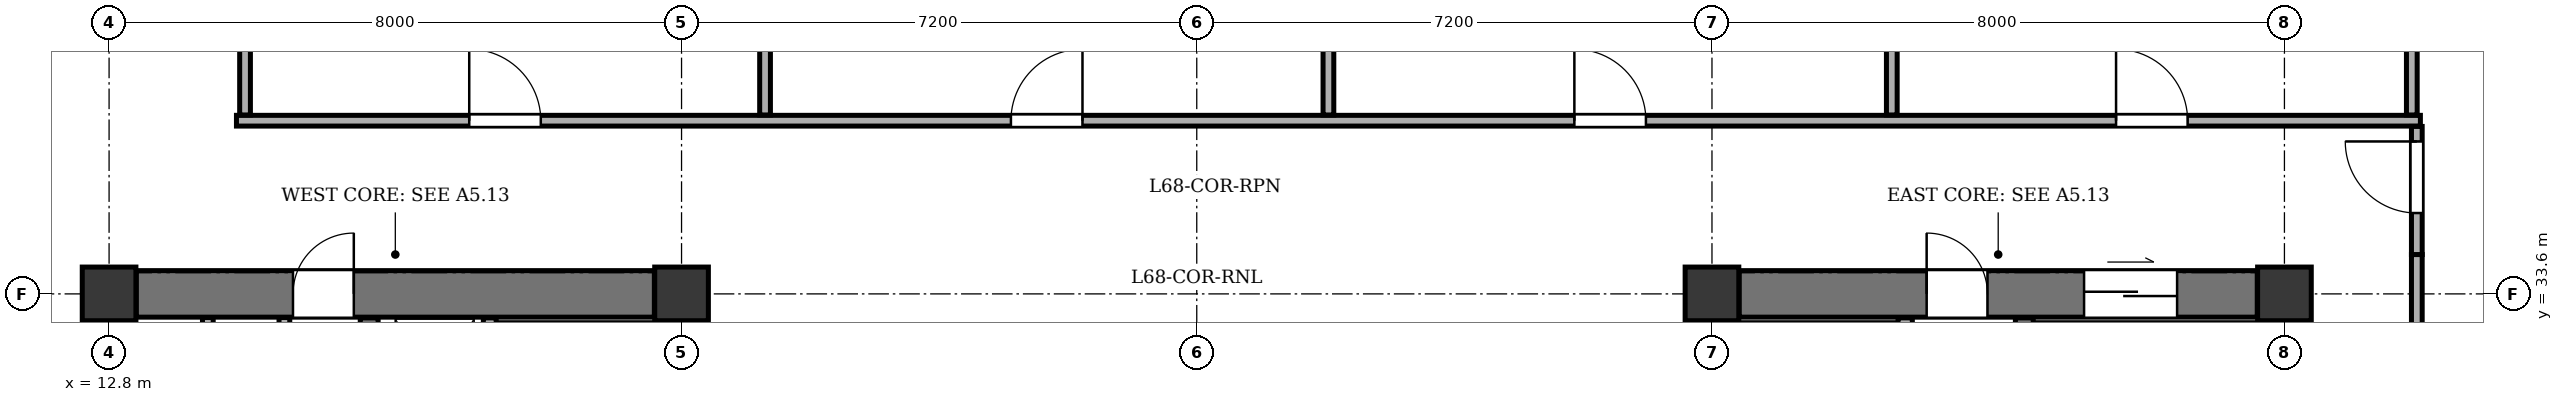
"""IFC4 building model, lengths in metres.
Left out: names, types, materials, properties, quantities, classifications, styles, units other than length and angle.
Written with IfcOpenShell. Run it as: python <this file> out.ifc"""

import sys

from ifc_helpers import new_model, si_unit, direction, frame, frame_2d, origin, origin_2d, place, context, subcontext, project, spatial, rectangle, extrude, element, fill, save


model = new_model("IFC4")
c1 = context("Model", 3, precision=1e-05, world=origin(), true_north=direction((0.0, 1.0)))
c2 = subcontext(c1, "Body", "Model", "MODEL_VIEW")
j1 = project(units=[si_unit("LENGTHUNIT", "METRE"), si_unit("PLANEANGLEUNIT", "RADIAN")], contexts=[c1])
p1 = place(None, origin())
s1 = spatial("IfcSite", under=j1, at=p1, CompositionType="ELEMENT")
p2 = place(p1, origin())
s2 = spatial("IfcBuilding", under=s1, at=p2, CompositionType="ELEMENT")
p3 = place(p2, frame((0.0, 0.0, 258.5)))
s3 = spatial("IfcBuildingStorey", under=s2, at=p3, CompositionType="ELEMENT", Elevation=258.5)
for number, where, z_axis, x_axis in (
    (1, (12.8, 33.6, 0.0), (0.0, 0.0, 1.0), (1.0, 0.0, 0.0)),
    (2, (20.8, 33.6, 0.0), (0.0, 0.0, 1.0), (1.0, 0.0, 0.0)),
    (3, (35.2, 33.6, 0.0), (0.0, 0.0, 1.0), (1.0, 0.0, 0.0)),
    (4, (43.2, 33.6, 0.0), (0.0, 0.0, 1.0), (1.0, 0.0, 0.0)),
):
    element("IfcColumn", number, at=place(p3, frame(where, z_axis=z_axis, x_axis=x_axis)), inside=s3, PredefinedType="COLUMN", context=c2, shape_type="SweptSolid", body=[
        extrude(rectangle(XDim=0.75, YDim=0.75, at=origin_2d()), origin(), (0.0, 0.0, 1.0), 3.4),
    ])
p4 = place(p3, frame((12.8, 21.18, 0.0), z_axis=(0.0, 0.0, 1.0), x_axis=(0.0, 1.0, 0.0)))
e5 = element("IfcWall", 5, at=p4, inside=s3, PredefinedType="SHEAR", context=c2, shape_type="SweptSolid", body=[
    extrude(rectangle(XDim=12.04, YDim=0.65, at=frame_2d((6.02, 0.0))), origin(), (0.0, 0.0, 1.0), 3.1),
])
p5 = place(p3, frame((13.18, 33.6, 0.0), z_axis=(0.0, 0.0, 1.0), x_axis=(1.0, 0.0, 0.0)))
e6 = element("IfcWall", 6, at=p5, inside=s3, PredefinedType="SHEAR", context=c2, shape_type="SweptSolid", body=[
    extrude(rectangle(XDim=7.24, YDim=0.65, at=frame_2d((3.62, 0.0))), origin(), (0.0, 0.0, 1.0), 3.1),
])
p6 = place(p5, frame((2.19, 0.0, 0.0)))
e7 = element("IfcOpeningElement", 7, at=p6, cuts=e6, PredefinedType="OPENING", context=c2, shape_type="SweptSolid", body=[
    extrude(rectangle(XDim=0.85, YDim=2.02, at=frame_2d((0.425, 1.01))), frame((0.0, 0.335, 0.0), z_axis=(0.0, -1.0, 0.0), x_axis=(1.0, 0.0, 0.0)), (0.0, 0.0, 1.0), 0.67),
])
p7 = place(p3, frame((20.8, 31.1, 0.0), z_axis=(0.0, 0.0, 1.0), x_axis=(0.0, 1.0, 0.0)))
e8 = element("IfcWall", 8, at=p7, inside=s3, PredefinedType="SHEAR", context=c2, shape_type="SweptSolid", body=[
    extrude(rectangle(XDim=2.12, YDim=0.65, at=frame_2d((1.06, 0.0))), origin(), (0.0, 0.0, 1.0), 3.1),
])
p8 = place(p7, frame((0.4, 0.0, 0.0)))
e9 = element("IfcOpeningElement", 9, at=p8, cuts=e8, PredefinedType="OPENING", context=c2, shape_type="SweptSolid", body=[
    extrude(rectangle(XDim=1.1, YDim=2.1, at=frame_2d((0.55, 1.05))), frame((0.0, 0.335, 0.0), z_axis=(0.0, -1.0, 0.0), x_axis=(1.0, 0.0, 0.0)), (0.0, 0.0, 1.0), 0.67),
])
p9 = place(p3, frame((16.435, 21.135, 0.0), z_axis=(0.0, 0.0, 1.0), x_axis=(0.0, 1.0, 0.0)))
e10 = element("IfcWall", 10, at=p9, inside=s3, PredefinedType="SHEAR", context=c2, shape_type="SweptSolid", body=[
    extrude(rectangle(XDim=12.13, YDim=0.25, at=frame_2d((6.065, 0.0))), origin(), (0.0, 0.0, 1.0), 3.1),
])
p10 = place(p9, frame((0.515, 0.0, 0.0)))
e11 = element("IfcOpeningElement", 11, at=p10, cuts=e10, PredefinedType="OPENING", context=c2, shape_type="SweptSolid", body=[
    extrude(rectangle(XDim=1.2, YDim=2.15, at=frame_2d((0.6, 1.075))), frame((0.0, 0.135, 0.0), z_axis=(0.0, -1.0, 0.0), x_axis=(1.0, 0.0, 0.0)), (0.0, 0.0, 1.0), 0.27),
])
p11 = place(p9, frame((2.665, 0.0, 0.0)))
e12 = element("IfcOpeningElement", 12, at=p11, cuts=e10, PredefinedType="OPENING", context=c2, shape_type="SweptSolid", body=[
    extrude(rectangle(XDim=1.15, YDim=2.15, at=frame_2d((0.575, 1.075))), frame((0.0, 0.135, 0.0), z_axis=(0.0, -1.0, 0.0), x_axis=(1.0, 0.0, 0.0)), (0.0, 0.0, 1.0), 0.27),
])
p12 = place(p3, frame((18.12, 31.17, 0.0), z_axis=(0.0, 0.0, 1.0), x_axis=(0.0, 1.0, 0.0)))
e13 = element("IfcWall", 13, at=p12, inside=s3, PredefinedType="PARTITIONING", context=c2, shape_type="SweptSolid", body=[
    extrude(rectangle(XDim=2.095, YDim=0.18, at=frame_2d((1.047, 0.0))), origin(), (0.0, 0.0, 1.0), 3.1),
])
p13 = place(p3, frame((43.2, 21.18, 0.0), z_axis=(0.0, 0.0, 1.0), x_axis=(0.0, 1.0, 0.0)))
e14 = element("IfcWall", 14, at=p13, inside=s3, PredefinedType="SHEAR", context=c2, shape_type="SweptSolid", body=[
    extrude(rectangle(XDim=12.04, YDim=0.65, at=frame_2d((6.02, 0.0))), origin(), (0.0, 0.0, 1.0), 3.1),
])
p14 = place(p3, frame((35.58, 33.6, 0.0), z_axis=(0.0, 0.0, 1.0), x_axis=(1.0, 0.0, 0.0)))
e15 = element("IfcWall", 15, at=p14, inside=s3, PredefinedType="SHEAR", context=c2, shape_type="SweptSolid", body=[
    extrude(rectangle(XDim=7.24, YDim=0.65, at=frame_2d((3.62, 0.0))), origin(), (0.0, 0.0, 1.0), 3.1),
])
p15 = place(p14, frame((4.82, 0.0, 0.0)))
e16 = element("IfcOpeningElement", 16, at=p15, cuts=e15, PredefinedType="OPENING", context=c2, shape_type="SweptSolid", body=[
    extrude(rectangle(XDim=1.3, YDim=2.15, at=frame_2d((0.65, 1.075))), frame((0.0, 0.335, 0.0), z_axis=(0.0, -1.0, 0.0), x_axis=(1.0, 0.0, 0.0)), (0.0, 0.0, 1.0), 0.67),
])
p16 = place(p14, frame((2.62, 0.0, 0.0)))
e17 = element("IfcOpeningElement", 17, at=p16, cuts=e15, PredefinedType="OPENING", context=c2, shape_type="SweptSolid", body=[
    extrude(rectangle(XDim=0.85, YDim=2.02, at=frame_2d((0.425, 1.01))), frame((0.0, 0.335, 0.0), z_axis=(0.0, -1.0, 0.0), x_axis=(1.0, 0.0, 0.0)), (0.0, 0.0, 1.0), 0.67),
])
p17 = place(p3, frame((35.2, 31.1, 0.0), z_axis=(0.0, 0.0, 1.0), x_axis=(0.0, 1.0, 0.0)))
e18 = element("IfcWall", 18, at=p17, inside=s3, PredefinedType="SHEAR", context=c2, shape_type="SweptSolid", body=[
    extrude(rectangle(XDim=2.12, YDim=0.65, at=frame_2d((1.06, 0.0))), origin(), (0.0, 0.0, 1.0), 3.1),
])
p18 = place(p17, frame((0.4, 0.0, 0.0)))
e19 = element("IfcOpeningElement", 19, at=p18, cuts=e18, PredefinedType="OPENING", context=c2, shape_type="SweptSolid", body=[
    extrude(rectangle(XDim=1.1, YDim=2.1, at=frame_2d((0.55, 1.05))), frame((0.0, 0.335, 0.0), z_axis=(0.0, -1.0, 0.0), x_axis=(1.0, 0.0, 0.0)), (0.0, 0.0, 1.0), 0.67),
])
p19 = place(p3, frame((39.565, 21.135, 0.0), z_axis=(0.0, 0.0, 1.0), x_axis=(0.0, 1.0, 0.0)))
e20 = element("IfcWall", 20, at=p19, inside=s3, PredefinedType="SHEAR", context=c2, shape_type="SweptSolid", body=[
    extrude(rectangle(XDim=12.13, YDim=0.25, at=frame_2d((6.065, 0.0))), origin(), (0.0, 0.0, 1.0), 3.1),
])
p20 = place(p19, frame((0.515, 0.0, 0.0)))
e21 = element("IfcOpeningElement", 21, at=p20, cuts=e20, PredefinedType="OPENING", context=c2, shape_type="SweptSolid", body=[
    extrude(rectangle(XDim=1.2, YDim=2.15, at=frame_2d((0.6, 1.075))), frame((0.0, 0.135, 0.0), z_axis=(0.0, -1.0, 0.0), x_axis=(1.0, 0.0, 0.0)), (0.0, 0.0, 1.0), 0.27),
])
p21 = place(p19, frame((2.665, 0.0, 0.0)))
e22 = element("IfcOpeningElement", 22, at=p21, cuts=e20, PredefinedType="OPENING", context=c2, shape_type="SweptSolid", body=[
    extrude(rectangle(XDim=1.15, YDim=2.15, at=frame_2d((0.575, 1.075))), frame((0.0, 0.135, 0.0), z_axis=(0.0, -1.0, 0.0), x_axis=(1.0, 0.0, 0.0)), (0.0, 0.0, 1.0), 0.27),
])
p22 = place(p3, frame((37.9, 25.27, 0.0), z_axis=(0.0, 0.0, 1.0), x_axis=(0.0, 1.0, 0.0)))
e23 = element("IfcWall", 23, at=p22, inside=s3, PredefinedType="SOLIDWALL", context=c2, shape_type="SweptSolid", body=[
    extrude(rectangle(XDim=7.995, YDim=0.2, at=frame_2d((3.998, 0.0))), origin(), (0.0, 0.0, 1.0), 3.1),
])
p23 = place(p3, frame((14.18, 30.96, 0.0), z_axis=(0.0, 0.0, 1.0), x_axis=(0.0, 1.0, 0.0)))
e24 = element("IfcWall", 24, at=p23, inside=s3, PredefinedType="PARTITIONING", context=c2, shape_type="SweptSolid", body=[
    extrude(rectangle(XDim=2.31, YDim=0.15, at=frame_2d((1.155, 0.0))), origin(), (0.0, 0.0, 1.0), 3.1),
])
p24 = place(p23, frame((0.47, 0.0, 0.0)))
e25 = element("IfcOpeningElement", 25, at=p24, cuts=e24, PredefinedType="OPENING", context=c2, shape_type="SweptSolid", body=[
    extrude(rectangle(XDim=0.85, YDim=2.02, at=frame_2d((0.425, 1.01))), frame((0.0, 0.085, 0.0), z_axis=(0.0, -1.0, 0.0), x_axis=(1.0, 0.0, 0.0)), (0.0, 0.0, 1.0), 0.17),
])
p25 = place(p3, frame((15.25, 30.96, 0.0), z_axis=(0.0, 0.0, 1.0), x_axis=(0.0, 1.0, 0.0)))
e26 = element("IfcWall", 26, at=p25, inside=s3, PredefinedType="PARTITIONING", context=c2, shape_type="SweptSolid", body=[
    extrude(rectangle(XDim=2.31, YDim=0.15, at=frame_2d((1.155, 0.0))), origin(), (0.0, 0.0, 1.0), 3.1),
])
p26 = place(p25, frame((0.47, 0.0, 0.0)))
e27 = element("IfcOpeningElement", 27, at=p26, cuts=e26, PredefinedType="OPENING", context=c2, shape_type="SweptSolid", body=[
    extrude(rectangle(XDim=0.85, YDim=2.02, at=frame_2d((0.425, 1.01))), frame((0.0, 0.085, 0.0), z_axis=(0.0, -1.0, 0.0), x_axis=(1.0, 0.0, 0.0)), (0.0, 0.0, 1.0), 0.17),
])
p27 = place(p3, frame((14.58, 36.02, 0.0), z_axis=(0.0, 0.0, 1.0), x_axis=(1.0, 0.0, 0.0)))
e28 = element("IfcWall", 28, at=p27, inside=s3, PredefinedType="PARTITIONING", context=c2, shape_type="SweptSolid", body=[
    extrude(rectangle(XDim=30.52, YDim=0.15, at=frame_2d((15.26, 0.0))), origin(), (0.0, 0.0, 1.0), 3.1),
])
p28 = place(p27, frame((3.253, 0.0, 0.0)))
e29 = element("IfcOpeningElement", 29, at=p28, cuts=e28, PredefinedType="OPENING", context=c2, shape_type="SweptSolid", body=[
    extrude(rectangle(XDim=1.0, YDim=2.1, at=frame_2d((0.5, 1.05))), frame((0.0, 0.085, 0.0), z_axis=(0.0, -1.0, 0.0), x_axis=(1.0, 0.0, 0.0)), (0.0, 0.0, 1.0), 0.17),
])
p29 = place(p27, frame((10.823, 0.0, 0.0)))
e30 = element("IfcOpeningElement", 30, at=p29, cuts=e28, PredefinedType="OPENING", context=c2, shape_type="SweptSolid", body=[
    extrude(rectangle(XDim=1.0, YDim=2.1, at=frame_2d((0.5, 1.05))), frame((0.0, 0.085, 0.0), z_axis=(0.0, -1.0, 0.0), x_axis=(1.0, 0.0, 0.0)), (0.0, 0.0, 1.0), 0.17),
])
p30 = place(p27, frame((18.697, 0.0, 0.0)))
e31 = element("IfcOpeningElement", 31, at=p30, cuts=e28, PredefinedType="OPENING", context=c2, shape_type="SweptSolid", body=[
    extrude(rectangle(XDim=1.0, YDim=2.1, at=frame_2d((0.5, 1.05))), frame((0.0, 0.085, 0.0), z_axis=(0.0, -1.0, 0.0), x_axis=(1.0, 0.0, 0.0)), (0.0, 0.0, 1.0), 0.17),
])
p31 = place(p27, frame((26.267, 0.0, 0.0)))
e32 = element("IfcOpeningElement", 32, at=p31, cuts=e28, PredefinedType="OPENING", context=c2, shape_type="SweptSolid", body=[
    extrude(rectangle(XDim=1.0, YDim=2.1, at=frame_2d((0.5, 1.05))), frame((0.0, 0.085, 0.0), z_axis=(0.0, -1.0, 0.0), x_axis=(1.0, 0.0, 0.0)), (0.0, 0.0, 1.0), 0.17),
])
for number, where, z_axis, x_axis in (
    (33, (14.7, 36.1, 0.0), (0.0, 0.0, 1.0), (0.0, 1.0, 0.0)),
    (34, (21.967, 36.1, 0.0), (0.0, 0.0, 1.0), (0.0, 1.0, 0.0)),
):
    element("IfcWall", number, at=place(p3, frame(where, z_axis=z_axis, x_axis=x_axis)), inside=s3, PredefinedType="PARTITIONING", context=c2, shape_type="SweptSolid", body=[
        extrude(rectangle(XDim=8.655, YDim=0.15, at=frame_2d((4.327, 0.0))), origin(), (0.0, 0.0, 1.0), 3.1),
    ])
p32 = place(p3, frame((29.84, 36.1, 0.0), z_axis=(0.0, 0.0, 1.0), x_axis=(0.0, 1.0, 0.0)))
e35 = element("IfcWall", 35, at=p32, inside=s3, PredefinedType="PARTITIONING", context=c2, shape_type="SweptSolid", body=[
    extrude(rectangle(XDim=8.655, YDim=0.15, at=frame_2d((4.327, 0.0))), origin(), (0.0, 0.0, 1.0), 2.725),
])
p33 = place(p3, frame((37.713, 36.1, 0.0), z_axis=(0.0, 0.0, 1.0), x_axis=(0.0, 1.0, 0.0)))
e36 = element("IfcWall", 36, at=p33, inside=s3, PredefinedType="PARTITIONING", context=c2, shape_type="SweptSolid", body=[
    extrude(rectangle(XDim=8.655, YDim=0.15, at=frame_2d((4.327, 0.0))), origin(), (0.0, 0.0, 1.0), 3.1),
])
p34 = place(p3, frame((44.98, 36.1, 0.0), z_axis=(0.0, 0.0, 1.0), x_axis=(0.0, 1.0, 0.0)))
e37 = element("IfcWall", 37, at=p34, inside=s3, PredefinedType="PARTITIONING", context=c2, shape_type="SweptSolid", body=[
    extrude(rectangle(XDim=8.655, YDim=0.15, at=frame_2d((4.327, 0.0))), origin(), (0.0, 0.0, 1.0), 2.725),
])
p35 = place(p3, frame((45.05, 20.25, 0.0), z_axis=(0.0, 0.0, 1.0), x_axis=(0.0, 1.0, 0.0)))
e38 = element("IfcWall", 38, at=p35, inside=s3, PredefinedType="PARTITIONING", context=c2, shape_type="SweptSolid", body=[
    extrude(rectangle(XDim=13.9, YDim=0.15, at=frame_2d((6.95, 0.0))), origin(), (0.0, 0.0, 1.0), 2.725),
])
p36 = place(p3, frame((45.05, 34.15, 0.0), z_axis=(0.0, 0.0, 1.0), x_axis=(0.0, 1.0, 0.0)))
e39 = element("IfcWall", 39, at=p36, inside=s3, PredefinedType="PARTITIONING", context=c2, shape_type="SweptSolid", body=[
    extrude(rectangle(XDim=1.79, YDim=0.15, at=frame_2d((0.895, 0.0))), origin(), (0.0, 0.0, 1.0), 2.725),
])
p37 = place(p36, frame((0.58, 0.0, 0.0)))
e40 = element("IfcOpeningElement", 40, at=p37, cuts=e39, PredefinedType="OPENING", context=c2, shape_type="SweptSolid", body=[
    extrude(rectangle(XDim=1.0, YDim=2.1, at=frame_2d((0.5, 1.05))), frame((0.0, 0.085, 0.0), z_axis=(0.0, -1.0, 0.0), x_axis=(1.0, 0.0, 0.0)), (0.0, 0.0, 1.0), 0.17),
])
p38 = place(p6, origin())
e41 = element("IfcDoor", 41, at=p38, inside=s3, OperationType="SINGLE_SWING_RIGHT", PredefinedType="DOOR", context=c2, shape_type="SweptSolid", body=[
    extrude(rectangle(XDim=0.85, YDim=2.02, at=frame_2d((0.425, 1.01))), frame((0.0, 0.025, 0.0), z_axis=(0.0, -1.0, 0.0), x_axis=(1.0, 0.0, 0.0)), (0.0, 0.0, 1.0), 0.05),
])
fill(e7, e41)
p39 = place(p15, origin())
e42 = element("IfcDoor", 42, at=p39, inside=s3, OperationType="DOUBLE_DOOR_SLIDING", PredefinedType="DOOR", context=c2, shape_type="SweptSolid", body=[
    extrude(rectangle(XDim=1.3, YDim=2.15, at=frame_2d((0.65, 1.075))), frame((0.0, 0.025, 0.0), z_axis=(0.0, -1.0, 0.0), x_axis=(1.0, 0.0, 0.0)), (0.0, 0.0, 1.0), 0.05),
])
fill(e16, e42)
p40 = place(p16, origin())
e43 = element("IfcDoor", 43, at=p40, inside=s3, OperationType="SINGLE_SWING_LEFT", PredefinedType="DOOR", context=c2, shape_type="SweptSolid", body=[
    extrude(rectangle(XDim=0.85, YDim=2.02, at=frame_2d((0.425, 1.01))), frame((0.0, 0.025, 0.0), z_axis=(0.0, -1.0, 0.0), x_axis=(1.0, 0.0, 0.0)), (0.0, 0.0, 1.0), 0.05),
])
fill(e17, e43)
p41 = place(p28, origin())
e44 = element("IfcDoor", 44, at=p41, inside=s3, OperationType="SINGLE_SWING_LEFT", PredefinedType="DOOR", context=c2, shape_type="SweptSolid", body=[
    extrude(rectangle(XDim=1.0, YDim=2.1, at=frame_2d((0.5, 1.05))), frame((0.0, 0.025, 0.0), z_axis=(0.0, -1.0, 0.0), x_axis=(1.0, 0.0, 0.0)), (0.0, 0.0, 1.0), 0.05),
])
fill(e29, e44)
p42 = place(p29, origin())
e45 = element("IfcDoor", 45, at=p42, inside=s3, OperationType="SINGLE_SWING_RIGHT", PredefinedType="DOOR", context=c2, shape_type="SweptSolid", body=[
    extrude(rectangle(XDim=1.0, YDim=2.1, at=frame_2d((0.5, 1.05))), frame((0.0, 0.025, 0.0), z_axis=(0.0, -1.0, 0.0), x_axis=(1.0, 0.0, 0.0)), (0.0, 0.0, 1.0), 0.05),
])
fill(e30, e45)
p43 = place(p30, origin())
e46 = element("IfcDoor", 46, at=p43, inside=s3, OperationType="SINGLE_SWING_LEFT", PredefinedType="DOOR", context=c2, shape_type="SweptSolid", body=[
    extrude(rectangle(XDim=1.0, YDim=2.1, at=frame_2d((0.5, 1.05))), frame((0.0, 0.025, 0.0), z_axis=(0.0, -1.0, 0.0), x_axis=(1.0, 0.0, 0.0)), (0.0, 0.0, 1.0), 0.05),
])
fill(e31, e46)
p44 = place(p31, origin())
e47 = element("IfcDoor", 47, at=p44, inside=s3, OperationType="SINGLE_SWING_LEFT", PredefinedType="DOOR", context=c2, shape_type="SweptSolid", body=[
    extrude(rectangle(XDim=1.0, YDim=2.1, at=frame_2d((0.5, 1.05))), frame((0.0, 0.025, 0.0), z_axis=(0.0, -1.0, 0.0), x_axis=(1.0, 0.0, 0.0)), (0.0, 0.0, 1.0), 0.05),
])
fill(e32, e47)
p45 = place(p37, origin())
e48 = element("IfcDoor", 48, at=p45, inside=s3, OperationType="SINGLE_SWING_RIGHT", PredefinedType="DOOR", context=c2, shape_type="SweptSolid", body=[
    extrude(rectangle(XDim=1.0, YDim=2.1, at=frame_2d((0.5, 1.05))), frame((0.0, 0.025, 0.0), z_axis=(0.0, -1.0, 0.0), x_axis=(1.0, 0.0, 0.0)), (0.0, 0.0, 1.0), 0.05),
])
fill(e40, e48)
save(model, sys.argv[1])
